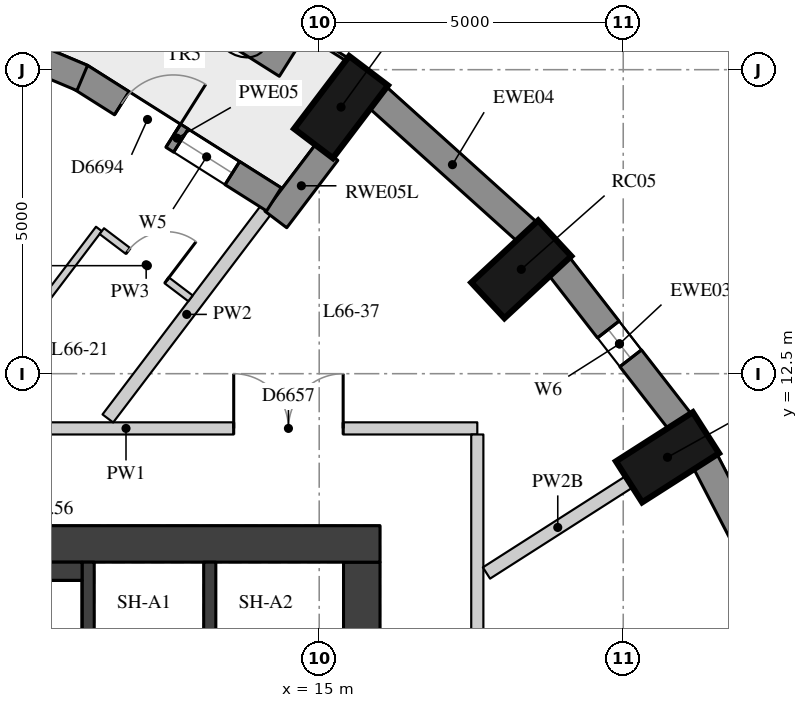
"""IFC4 building model, lengths in metres.
Left out: names, types, materials, properties, quantities, classifications, styles, units other than length and angle.
Written with IfcOpenShell. Run it as: python <this file> out.ifc"""

import sys

from ifc_helpers import new_model, si_unit, direction, frame, frame_2d, origin, origin_2d, place, context, subcontext, project, spatial, rectangle, extrude, element, fill, save


model = new_model("IFC4")
c1 = context("Model", 3, precision=1e-05, world=origin(), true_north=direction((0.0, 1.0)))
c2 = subcontext(c1, "Body", "Model", "MODEL_VIEW")
j1 = project(units=[si_unit("LENGTHUNIT", "METRE"), si_unit("PLANEANGLEUNIT", "RADIAN")], contexts=[c1])
p1 = place(None, origin())
s1 = spatial("IfcSite", under=j1, at=p1, CompositionType="ELEMENT")
p2 = place(p1, origin())
s2 = spatial("IfcBuilding", under=s1, at=p2, CompositionType="ELEMENT")
p3 = place(p2, frame((0.0, 0.0, 233.3)))
s3 = spatial("IfcBuildingStorey", under=s2, at=p3, CompositionType="ELEMENT", Elevation=233.3)
for number, where, z_axis, x_axis in (
    (1, (22.5, 7.705, 0.0), (0.0, 0.0, 1.0), (0.928, 0.374, 0.0)),
    (2, (20.728, 11.125, 0.0), (0.0, 0.0, 1.0), (0.843, 0.539, 0.0)),
    (3, (18.323, 14.216, 0.0), (0.0, 0.0, 1.0), (0.733, 0.681, 0.0)),
    (4, (15.359, 16.885, 0.0), (0.0, 0.0, 1.0), (0.604, 0.797, 0.0)),
):
    element("IfcColumn", number, at=place(p3, frame(where, z_axis=z_axis, x_axis=x_axis)), inside=s3, PredefinedType="COLUMN", context=c2, shape_type="SweptSolid", body=[
        extrude(rectangle(XDim=1.5, YDim=0.8, at=origin_2d()), origin(), (0.0, 0.0, 1.0), 3.3),
    ])
p4 = place(p3, frame((22.81, 8.24, 0.0), z_axis=(0.0, 0.0, 1.0), x_axis=(-0.459889857669, 0.887975967475, 0.0)))
e5 = element("IfcWall", 5, at=p4, inside=s3, PredefinedType="SOLIDWALL", context=c2, shape_type="SweptSolid", body=[
    extrude(rectangle(XDim=3.186, YDim=0.45, at=frame_2d((1.593, 0.0))), origin(), (0.0, 0.0, 1.0), 3.02),
])
p5 = place(p3, frame((20.935, 11.708, 0.0), z_axis=(0.0, 0.0, 1.0), x_axis=(-0.613862536705, 0.789412937587, 0.0)))
e6 = element("IfcWall", 6, at=p5, inside=s3, PredefinedType="SOLIDWALL", context=c2, shape_type="SweptSolid", body=[
    extrude(rectangle(XDim=3.247, YDim=0.45, at=frame_2d((1.624, 0.0))), origin(), (0.0, 0.0, 1.0), 3.02),
])
p6 = place(p5, frame((1.324, 0.0, 0.4)))
e7 = element("IfcOpeningElement", 7, at=p6, cuts=e6, PredefinedType="OPENING", context=c2, shape_type="SweptSolid", body=[
    extrude(rectangle(XDim=0.6, YDim=1.75, at=frame_2d((0.3, 0.875))), frame((0.0, 0.235, 0.0), z_axis=(0.0, -1.0, 0.0), x_axis=(1.0, 0.0, 0.0)), (0.0, 0.0, 1.0), 0.47),
])
p7 = place(p3, frame((18.424, 14.828, 0.0), z_axis=(0.0, 0.0, 1.0), x_axis=(-0.743166014219, 0.669107073128, 0.0)))
e8 = element("IfcWall", 8, at=p7, inside=s3, PredefinedType="SOLIDWALL", context=c2, shape_type="SweptSolid", body=[
    extrude(rectangle(XDim=3.316, YDim=0.45, at=frame_2d((1.658, 0.0))), origin(), (0.0, 0.0, 1.0), 3.02),
])
p8 = place(p3, frame((15.127, 16.145, 0.0), z_axis=(0.0, 0.0, 1.0), x_axis=(-0.603952302908, -0.797020461351, 0.0)))
e9 = element("IfcWall", 9, at=p8, inside=s3, PredefinedType="SOLIDWALL", context=c2, shape_type="SweptSolid", body=[
    extrude(rectangle(XDim=1.391, YDim=0.45, at=frame_2d((0.695, 0.0))), origin(), (0.0, 0.0, 1.0), 3.02),
])
p9 = place(p3, frame((14.255, 15.367, 0.0), z_axis=(0.0, 0.0, 1.0), x_axis=(-0.845183955488, 0.534475519912, 0.0)))
e10 = element("IfcWall", 10, at=p9, inside=s3, PredefinedType="SOLIDWALL", context=c2, shape_type="SweptSolid", body=[
    extrude(rectangle(XDim=3.769, YDim=0.45, at=frame_2d((1.884, 0.0))), origin(), (0.0, 0.0, 1.0), 3.02),
])
p10 = place(p9, frame((0.809, 0.0, 0.4)))
e11 = element("IfcOpeningElement", 11, at=p10, cuts=e10, PredefinedType="OPENING", context=c2, shape_type="SweptSolid", body=[
    extrude(rectangle(XDim=1.0, YDim=1.75, at=frame_2d((0.5, 0.875))), frame((0.0, 0.235, 0.0), z_axis=(0.0, -1.0, 0.0), x_axis=(1.0, 0.0, 0.0)), (0.0, 0.0, 1.0), 0.47),
])
p11 = place(p9, frame((1.959, 0.0, 0.0)))
e12 = element("IfcOpeningElement", 12, at=p11, cuts=e10, PredefinedType="OPENING", context=c2, shape_type="SweptSolid", body=[
    extrude(rectangle(XDim=1.0, YDim=2.15, at=frame_2d((0.5, 1.075))), frame((0.0, 0.235, 0.0), z_axis=(0.0, -1.0, 0.0), x_axis=(1.0, 0.0, 0.0)), (0.0, 0.0, 1.0), 0.47),
])
p12 = place(p3, frame((11.103, 17.364, 0.0), z_axis=(0.0, 0.0, 1.0), x_axis=(-0.921612755574, 0.388110717145, 0.0)))
e13 = element("IfcWall", 13, at=p12, inside=s3, PredefinedType="SOLIDWALL", context=c2, shape_type="SweptSolid", body=[
    extrude(rectangle(XDim=3.86, YDim=0.45, at=frame_2d((1.93, 0.0))), origin(), (0.0, 0.0, 1.0), 3.02),
])
p13 = place(p12, frame((0.855, 0.0, 0.4)))
e14 = element("IfcOpeningElement", 14, at=p13, cuts=e13, PredefinedType="OPENING", context=c2, shape_type="SweptSolid", body=[
    extrude(rectangle(XDim=1.0, YDim=1.75, at=frame_2d((0.5, 0.875))), frame((0.0, 0.235, 0.0), z_axis=(0.0, -1.0, 0.0), x_axis=(1.0, 0.0, 0.0)), (0.0, 0.0, 1.0), 0.47),
])
p14 = place(p12, frame((2.005, 0.0, 0.0)))
e15 = element("IfcOpeningElement", 15, at=p14, cuts=e13, PredefinedType="OPENING", context=c2, shape_type="SweptSolid", body=[
    extrude(rectangle(XDim=1.0, YDim=2.15, at=frame_2d((0.5, 1.075))), frame((0.0, 0.235, 0.0), z_axis=(0.0, -1.0, 0.0), x_axis=(1.0, 0.0, 0.0)), (0.0, 0.0, 1.0), 0.47),
])
p15 = place(p3, frame((14.531, 17.687, 0.0), z_axis=(0.0, 0.0, 1.0), x_axis=(-0.845888351787, 0.533360006291, 0.0)))
e16 = element("IfcWall", 16, at=p15, inside=s3, PredefinedType="USERDEFINED", context=c2, shape_type="SweptSolid", body=[
    extrude(rectangle(XDim=1.8, YDim=0.7, at=frame_2d((0.9, 0.0))), origin(), (0.0, 0.0, 1.0), 0.75),
])
p16 = place(p3, frame((15.7, -9.4, 0.0), z_axis=(0.0, 0.0, 1.0), x_axis=(0.0, 1.0, 0.0)))
e17 = element("IfcWall", 17, at=p16, inside=s3, PredefinedType="SHEAR", context=c2, shape_type="SweptSolid", body=[
    extrude(rectangle(XDim=18.8, YDim=0.6, at=frame_2d((9.4, 0.0))), origin(), (0.0, 0.0, 1.0), 3.02),
])
p17 = place(p16, frame((13.4, 0.0, 0.0)))
e18 = element("IfcOpeningElement", 18, at=p17, cuts=e17, PredefinedType="OPENING", context=c2, shape_type="SweptSolid", body=[
    extrude(rectangle(XDim=1.5, YDim=2.1, at=frame_2d((0.75, 1.05))), frame((0.0, 0.31, 0.0), z_axis=(0.0, -1.0, 0.0), x_axis=(1.0, 0.0, 0.0)), (0.0, 0.0, 1.0), 0.62),
])
p18 = place(p16, frame((3.9, 0.0, 0.0)))
e19 = element("IfcOpeningElement", 19, at=p18, cuts=e17, PredefinedType="OPENING", context=c2, shape_type="SweptSolid", body=[
    extrude(rectangle(XDim=1.5, YDim=2.1, at=frame_2d((0.75, 1.05))), frame((0.0, 0.31, 0.0), z_axis=(0.0, -1.0, 0.0), x_axis=(1.0, 0.0, 0.0)), (0.0, 0.0, 1.0), 0.62),
])
p19 = place(p3, frame((4.0, 9.7, 0.0), z_axis=(0.0, 0.0, 1.0), x_axis=(1.0, 0.0, 0.0)))
e20 = element("IfcWall", 20, at=p19, inside=s3, PredefinedType="SHEAR", context=c2, shape_type="SweptSolid", body=[
    extrude(rectangle(XDim=12.0, YDim=0.6, at=frame_2d((6.0, 0.0))), origin(), (0.0, 0.0, 1.0), 3.02),
])
for number, where, z_axis, x_axis in (
    (21, (11.2, 5.9, 0.0), (0.0, 0.0, 1.0), (0.0, 1.0, 0.0)),
    (22, (13.2, 5.9, 0.0), (0.0, 0.0, 1.0), (0.0, 1.0, 0.0)),
):
    element("IfcWall", number, at=place(p3, frame(where, z_axis=z_axis, x_axis=x_axis)), inside=s3, PredefinedType="SHEAR", context=c2, shape_type="SweptSolid", body=[
        extrude(rectangle(XDim=3.5, YDim=0.2, at=frame_2d((1.75, 0.0))), origin(), (0.0, 0.0, 1.0), 3.02),
    ])
p20 = place(p3, frame((6.22, 9.25, 0.0), z_axis=(0.0, 0.0, 1.0), x_axis=(1.0, 0.0, 0.0)))
e23 = element("IfcWall", 23, at=p20, inside=s3, PredefinedType="PARTITIONING", context=c2, shape_type="SweptSolid", body=[
    extrude(rectangle(XDim=4.88, YDim=0.3, at=frame_2d((2.44, 0.0))), origin(), (0.0, 0.0, 1.0), 3.02),
])
p21 = place(p3, frame((6.045, 11.6, 0.0), z_axis=(0.0, 0.0, 1.0), x_axis=(1.0, 0.0, 0.0)))
e24 = element("IfcWall", 24, at=p21, inside=s3, PredefinedType="PARTITIONING", context=c2, shape_type="SweptSolid", body=[
    extrude(rectangle(XDim=11.555, YDim=0.2, at=frame_2d((5.777, 0.0))), origin(), (0.0, 0.0, 1.0), 3.02),
])
p22 = place(p21, frame((1.461, 0.0, 0.0)))
e25 = element("IfcOpeningElement", 25, at=p22, cuts=e24, PredefinedType="OPENING", context=c2, shape_type="SweptSolid", body=[
    extrude(rectangle(XDim=1.1, YDim=2.1, at=frame_2d((0.55, 1.05))), frame((0.0, 0.11, 0.0), z_axis=(0.0, -1.0, 0.0), x_axis=(1.0, 0.0, 0.0)), (0.0, 0.0, 1.0), 0.22),
])
p23 = place(p21, frame((7.549, 0.0, 0.0)))
e26 = element("IfcOpeningElement", 26, at=p23, cuts=e24, PredefinedType="OPENING", context=c2, shape_type="SweptSolid", body=[
    extrude(rectangle(XDim=1.8, YDim=2.1, at=frame_2d((0.9, 1.05))), frame((0.0, 0.11, 0.0), z_axis=(0.0, -1.0, 0.0), x_axis=(1.0, 0.0, 0.0)), (0.0, 0.0, 1.0), 0.22),
])
p24 = place(p3, frame((17.6, 11.5, 0.0), z_axis=(0.0, 0.0, 1.0), x_axis=(0.0, -1.0, 0.0)))
e27 = element("IfcWall", 27, at=p24, inside=s3, PredefinedType="PARTITIONING", context=c2, shape_type="SweptSolid", body=[
    extrude(rectangle(XDim=23.1, YDim=0.2, at=frame_2d((11.55, 0.0))), origin(), (0.0, 0.0, 1.0), 3.02),
])
p25 = place(p24, frame((18.96, 0.0, 0.0)))
e28 = element("IfcOpeningElement", 28, at=p25, cuts=e27, PredefinedType="OPENING", context=c2, shape_type="SweptSolid", body=[
    extrude(rectangle(XDim=1.8, YDim=2.1, at=frame_2d((0.9, 1.05))), frame((0.0, 0.11, 0.0), z_axis=(0.0, -1.0, 0.0), x_axis=(1.0, 0.0, 0.0)), (0.0, 0.0, 1.0), 0.22),
])
p26 = place(p24, frame((11.617, 0.0, 0.0)))
e29 = element("IfcOpeningElement", 29, at=p26, cuts=e27, PredefinedType="OPENING", context=c2, shape_type="SweptSolid", body=[
    extrude(rectangle(XDim=1.8, YDim=2.1, at=frame_2d((0.9, 1.05))), frame((0.0, 0.11, 0.0), z_axis=(0.0, -1.0, 0.0), x_axis=(1.0, 0.0, 0.0)), (0.0, 0.0, 1.0), 0.22),
])
p27 = place(p24, frame((4.591, 0.0, 0.0)))
e30 = element("IfcOpeningElement", 30, at=p27, cuts=e27, PredefinedType="OPENING", context=c2, shape_type="SweptSolid", body=[
    extrude(rectangle(XDim=1.8, YDim=2.1, at=frame_2d((0.9, 1.05))), frame((0.0, 0.11, 0.0), z_axis=(0.0, -1.0, 0.0), x_axis=(1.0, 0.0, 0.0)), (0.0, 0.0, 1.0), 0.22),
])
p28 = place(p3, frame((20.096, 10.721, 0.0), z_axis=(0.0, 0.0, 1.0), x_axis=(-0.842583486412, -0.538565751256, 0.0)))
e31 = element("IfcWall", 31, at=p28, inside=s3, PredefinedType="PARTITIONING", context=c2, shape_type="SweptSolid", body=[
    extrude(rectangle(XDim=2.783, YDim=0.22, at=frame_2d((1.392, 0.0))), origin(), (0.0, 0.0, 1.0), 2.57),
])
p29 = place(p3, frame((14.119, 15.187, 0.0), z_axis=(0.0, 0.0, 1.0), x_axis=(-0.604075434344, -0.796927141978, 0.0)))
e32 = element("IfcWall", 32, at=p29, inside=s3, PredefinedType="PARTITIONING", context=c2, shape_type="SweptSolid", body=[
    extrude(rectangle(XDim=4.295, YDim=0.22, at=frame_2d((2.148, 0.0))), origin(), (0.0, 0.0, 1.0), 3.02),
])
p30 = place(p3, frame((8.99, 11.732, 0.0), z_axis=(0.0, 0.0, 1.0), x_axis=(0.604075378366, 0.79692718441, 0.0)))
e33 = element("IfcWall", 33, at=p30, inside=s3, PredefinedType="PARTITIONING", context=c2, shape_type="SweptSolid", body=[
    extrude(rectangle(XDim=3.951, YDim=0.12, at=frame_2d((1.976, 0.0))), origin(), (0.0, 0.0, 1.0), 3.02),
])
p31 = place(p3, frame((11.425, 14.844, 0.0), z_axis=(0.0, 0.0, 1.0), x_axis=(0.796899454755, -0.604111959004, 0.0)))
e34 = element("IfcWall", 34, at=p31, inside=s3, PredefinedType="PARTITIONING", context=c2, shape_type="SweptSolid", body=[
    extrude(rectangle(XDim=1.83, YDim=0.12, at=frame_2d((0.915, 0.0))), origin(), (0.0, 0.0, 1.0), 3.02),
])
p32 = place(p31, frame((0.54, 0.0, 0.0)))
e35 = element("IfcOpeningElement", 35, at=p32, cuts=e34, PredefinedType="OPENING", context=c2, shape_type="SweptSolid", body=[
    extrude(rectangle(XDim=0.8, YDim=2.1, at=frame_2d((0.4, 1.05))), frame((0.0, 0.07, 0.0), z_axis=(0.0, -1.0, 0.0), x_axis=(1.0, 0.0, 0.0)), (0.0, 0.0, 1.0), 0.14),
])
p33 = place(p6, origin())
e36 = element("IfcWindow", 36, at=p33, inside=s3, PartitioningType="SINGLE_PANEL", PredefinedType="WINDOW", context=c2, shape_type="SweptSolid", body=[
    extrude(rectangle(XDim=0.6, YDim=1.75, at=frame_2d((0.3, 0.875))), frame((0.0, 0.035, 0.0), z_axis=(0.0, -1.0, 0.0), x_axis=(1.0, 0.0, 0.0)), (0.0, 0.0, 1.0), 0.06),
])
fill(e7, e36)
p34 = place(p10, origin())
e37 = element("IfcWindow", 37, at=p34, inside=s3, PartitioningType="SINGLE_PANEL", PredefinedType="WINDOW", context=c2, shape_type="SweptSolid", body=[
    extrude(rectangle(XDim=1.0, YDim=1.75, at=frame_2d((0.5, 0.875))), frame((0.0, 0.035, 0.0), z_axis=(0.0, -1.0, 0.0), x_axis=(1.0, 0.0, 0.0)), (0.0, 0.0, 1.0), 0.06),
])
fill(e11, e37)
p35 = place(p11, frame((1.0, 0.0, 0.0), z_axis=(0.0, 0.0, 1.0), x_axis=(-1.0, 0.0, 0.0)))
e38 = element("IfcDoor", 38, at=p35, inside=s3, OperationType="SINGLE_SWING_RIGHT", PredefinedType="DOOR", context=c2, shape_type="SweptSolid", body=[
    extrude(rectangle(XDim=1.0, YDim=2.15, at=frame_2d((0.5, 1.075))), frame((0.0, 0.075, 0.0), z_axis=(0.0, -1.0, 0.0), x_axis=(1.0, 0.0, 0.0)), (0.0, 0.0, 1.0), 0.05),
])
fill(e12, e38)
p36 = place(p32, origin())
e39 = element("IfcDoor", 39, at=p36, inside=s3, OperationType="SINGLE_SWING_RIGHT", PredefinedType="DOOR", context=c2, shape_type="SweptSolid", body=[
    extrude(rectangle(XDim=0.8, YDim=2.1, at=frame_2d((0.4, 1.05))), frame((0.0, 0.025, 0.0), z_axis=(0.0, -1.0, 0.0), x_axis=(1.0, 0.0, 0.0)), (0.0, 0.0, 1.0), 0.05),
])
fill(e35, e39)
p37 = place(p23, origin())
e40 = element("IfcDoor", 40, at=p37, inside=s3, OperationType="DOUBLE_DOOR_SINGLE_SWING", PredefinedType="DOOR", context=c2, shape_type="SweptSolid", body=[
    extrude(rectangle(XDim=1.8, YDim=2.1, at=frame_2d((0.9, 1.05))), frame((0.0, 0.025, 0.0), z_axis=(0.0, -1.0, 0.0), x_axis=(1.0, 0.0, 0.0)), (0.0, 0.0, 1.0), 0.05),
])
fill(e26, e40)
save(model, sys.argv[1])
